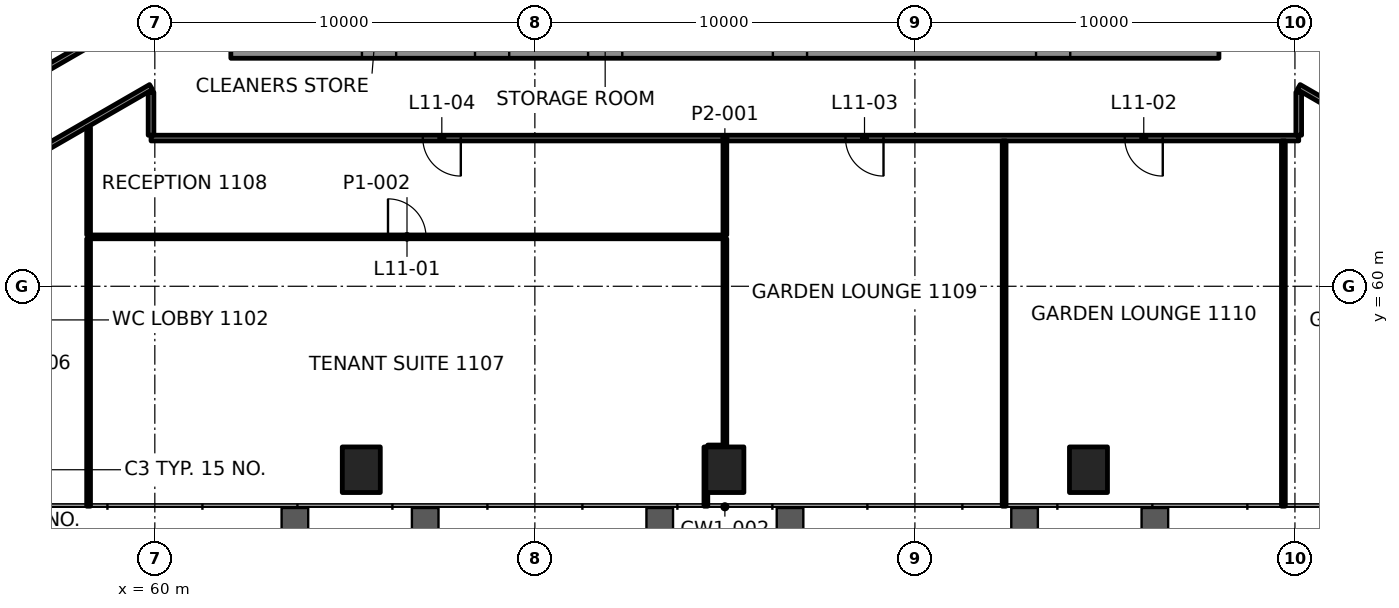
"""IFC4 building model, lengths in metres.
Left out: names, types, materials, properties, quantities, classifications, styles, units other than length and angle.
Written with IfcOpenShell. Run it as: python <this file> out.ifc"""

import sys

from ifc_helpers import new_model, si_unit, direction, frame, frame_2d, origin, origin_2d, place, context, subcontext, project, spatial, rectangle, extrude, element, fill, save


model = new_model("IFC4")
c1 = context("Model", 3, precision=1e-05, world=origin(), true_north=direction((0.0, 1.0)))
c2 = subcontext(c1, "Body", "Model", "MODEL_VIEW")
j1 = project(units=[si_unit("LENGTHUNIT", "METRE"), si_unit("PLANEANGLEUNIT", "RADIAN")], contexts=[c1])
p1 = place(None, origin())
s1 = spatial("IfcSite", under=j1, at=p1, CompositionType="ELEMENT")
p2 = place(p1, origin())
s2 = spatial("IfcBuilding", under=s1, at=p2, CompositionType="ELEMENT")
p3 = place(p2, frame((0.0, 0.0, 52.6)))
s3 = spatial("IfcBuildingStorey", under=s2, at=p3, CompositionType="ELEMENT", Elevation=52.6)
for number, where, z_axis, x_axis in (
    (1, (65.433, 55.172, -0.0), (0.0, 0.0, 1.0), (1.0, 0.0, 0.0)),
    (2, (75.0, 55.172, -0.0), (0.0, 0.0, 1.0), (1.0, 0.0, 0.0)),
    (3, (84.567, 55.172, -0.0), (0.0, 0.0, 1.0), (1.0, 0.0, 0.0)),
):
    element("IfcColumn", number, at=place(p3, frame(where, z_axis=z_axis, x_axis=x_axis)), inside=s3, PredefinedType="COLUMN", context=c2, shape_type="SweptSolid", body=[
        extrude(rectangle(XDim=1.0, YDim=1.2, at=origin_2d()), origin(), (0.0, 0.0, 1.0), 4.2),
    ])
p4 = place(p3, frame((62.0, 66.45, 0.0), z_axis=(0.0, 0.0, 1.0), x_axis=(1.0, 0.0, 0.0)))
e4 = element("IfcWall", 4, at=p4, inside=s3, PredefinedType="SHEAR", context=c2, shape_type="SweptSolid", body=[
    extrude(rectangle(XDim=26.0, YDim=0.9, at=frame_2d((13.0, 0.0))), origin(), (0.0, 0.0, 1.0), 4.0),
])
p5 = place(p4, frame((3.45, 0.0, 0.0)))
e5 = element("IfcOpeningElement", 5, at=p5, cuts=e4, PredefinedType="OPENING", context=c2, shape_type="SweptSolid", body=[
    extrude(rectangle(XDim=0.9, YDim=2.1, at=frame_2d((0.45, 1.05))), frame((0.0, 0.46, 0.0), z_axis=(0.0, -1.0, 0.0), x_axis=(1.0, 0.0, 0.0)), (0.0, 0.0, 1.0), 0.92),
])
p6 = place(p4, frame((6.425, 0.0, 0.0)))
e6 = element("IfcOpeningElement", 6, at=p6, cuts=e4, PredefinedType="OPENING", context=c2, shape_type="SweptSolid", body=[
    extrude(rectangle(XDim=0.9, YDim=2.1, at=frame_2d((0.45, 1.05))), frame((0.0, 0.46, 0.0), z_axis=(0.0, -1.0, 0.0), x_axis=(1.0, 0.0, 0.0)), (0.0, 0.0, 1.0), 0.92),
])
p7 = place(p4, frame((9.4, 0.0, 0.0)))
e7 = element("IfcOpeningElement", 7, at=p7, cuts=e4, PredefinedType="OPENING", context=c2, shape_type="SweptSolid", body=[
    extrude(rectangle(XDim=0.9, YDim=2.1, at=frame_2d((0.45, 1.05))), frame((0.0, 0.46, 0.0), z_axis=(0.0, -1.0, 0.0), x_axis=(1.0, 0.0, 0.0)), (0.0, 0.0, 1.0), 0.92),
])
p8 = place(p4, frame((14.262, 0.0, 0.0)))
e8 = element("IfcOpeningElement", 8, at=p8, cuts=e4, PredefinedType="OPENING", context=c2, shape_type="SweptSolid", body=[
    extrude(rectangle(XDim=0.9, YDim=2.1, at=frame_2d((0.45, 1.05))), frame((0.0, 0.46, 0.0), z_axis=(0.0, -1.0, 0.0), x_axis=(1.0, 0.0, 0.0)), (0.0, 0.0, 1.0), 0.92),
])
p9 = place(p4, frame((21.188, 0.0, 0.0)))
e9 = element("IfcOpeningElement", 9, at=p9, cuts=e4, PredefinedType="OPENING", context=c2, shape_type="SweptSolid", body=[
    extrude(rectangle(XDim=0.9, YDim=2.1, at=frame_2d((0.45, 1.05))), frame((0.0, 0.46, 0.0), z_axis=(0.0, -1.0, 0.0), x_axis=(1.0, 0.0, 0.0)), (0.0, 0.0, 1.0), 0.92),
])
p10 = place(p3, frame((74.551, 55.772, 0.0), z_axis=(0.0, 0.0, 1.0), x_axis=(1.0, 0.0, 0.0)))
e10 = element("IfcWall", 10, at=p10, inside=s3, PredefinedType="PARTITIONING", context=c2, shape_type="SweptSolid", body=[
    extrude(rectangle(XDim=0.399, YDim=0.1, at=frame_2d((0.199, 0.0))), origin(), (0.0, 0.0, 1.0), 3.4),
])
p11 = place(p3, frame((58.271, 61.3, 0.0), z_axis=(0.0, 0.0, 1.0), x_axis=(1.0, 0.0, 0.0)))
e11 = element("IfcWall", 11, at=p11, inside=s3, PredefinedType="PARTITIONING", context=c2, shape_type="SweptSolid", body=[
    extrude(rectangle(XDim=16.729, YDim=0.1, at=frame_2d((8.365, 0.0))), origin(), (0.0, 0.0, 1.0), 3.4),
])
p12 = place(p11, frame((7.865, 0.0, 0.0)))
e12 = element("IfcOpeningElement", 12, at=p12, cuts=e11, PredefinedType="OPENING", context=c2, shape_type="SweptSolid", body=[
    extrude(rectangle(XDim=1.0, YDim=2.1, at=frame_2d((0.5, 1.05))), frame((0.0, 0.06, 0.0), z_axis=(0.0, -1.0, 0.0), x_axis=(1.0, 0.0, 0.0)), (0.0, 0.0, 1.0), 0.12),
])
p13 = place(p3, frame((90.1, 63.9, 0.0), z_axis=(0.0, 0.0, 1.0), x_axis=(-1.0, 0.0, 0.0)))
e13 = element("IfcWall", 13, at=p13, inside=s3, PredefinedType="PARTITIONING", context=c2, shape_type="SweptSolid", body=[
    extrude(rectangle(XDim=30.2, YDim=0.15, at=frame_2d((15.1, 0.0))), origin(), (0.0, 0.0, 1.0), 3.4),
])
p14 = place(p13, frame((3.578, 0.0, 0.0)))
e14 = element("IfcOpeningElement", 14, at=p14, cuts=e13, PredefinedType="OPENING", context=c2, shape_type="SweptSolid", body=[
    extrude(rectangle(XDim=1.0, YDim=2.1, at=frame_2d((0.5, 1.05))), frame((0.0, 0.085, 0.0), z_axis=(0.0, -1.0, 0.0), x_axis=(1.0, 0.0, 0.0)), (0.0, 0.0, 1.0), 0.17),
])
p15 = place(p13, frame((10.926, 0.0, 0.0)))
e15 = element("IfcOpeningElement", 15, at=p15, cuts=e13, PredefinedType="OPENING", context=c2, shape_type="SweptSolid", body=[
    extrude(rectangle(XDim=1.0, YDim=2.1, at=frame_2d((0.5, 1.05))), frame((0.0, 0.085, 0.0), z_axis=(0.0, -1.0, 0.0), x_axis=(1.0, 0.0, 0.0)), (0.0, 0.0, 1.0), 0.17),
])
p16 = place(p13, frame((22.048, 0.0, 0.0)))
e16 = element("IfcOpeningElement", 16, at=p16, cuts=e13, PredefinedType="OPENING", context=c2, shape_type="SweptSolid", body=[
    extrude(rectangle(XDim=1.0, YDim=2.1, at=frame_2d((0.5, 1.05))), frame((0.0, 0.085, 0.0), z_axis=(0.0, -1.0, 0.0), x_axis=(1.0, 0.0, 0.0)), (0.0, 0.0, 1.0), 0.17),
])
p17 = place(p3, frame((59.9, 65.243, 0.0), z_axis=(0.0, 0.0, 1.0), x_axis=(-0.866026378386, -0.499998311937, 0.0)))
e17 = element("IfcWall", 17, at=p17, inside=s3, PredefinedType="PARTITIONING", context=c2, shape_type="SweptSolid", body=[
    extrude(rectangle(XDim=13.764, YDim=0.15, at=frame_2d((6.882, 0.0))), origin(), (0.0, 0.0, 1.0), 3.247),
])
p18 = place(p17, frame((4.209, 0.0, 0.0)))
e18 = element("IfcOpeningElement", 18, at=p18, cuts=e17, PredefinedType="OPENING", context=c2, shape_type="SweptSolid", body=[
    extrude(rectangle(XDim=0.9, YDim=2.1, at=frame_2d((0.45, 1.05))), frame((0.0, 0.085, 0.0), z_axis=(0.0, -1.0, 0.0), x_axis=(1.0, 0.0, 0.0)), (0.0, 0.0, 1.0), 0.17),
])
p19 = place(p17, frame((9.891, 0.0, 0.0)))
e19 = element("IfcOpeningElement", 19, at=p19, cuts=e17, PredefinedType="OPENING", context=c2, shape_type="SweptSolid", body=[
    extrude(rectangle(XDim=1.2, YDim=2.1, at=frame_2d((0.6, 1.05))), frame((0.0, 0.085, 0.0), z_axis=(0.0, -1.0, 0.0), x_axis=(1.0, 0.0, 0.0)), (0.0, 0.0, 1.0), 0.17),
])
p20 = place(p3, frame((47.08, 59.92, 0.0), z_axis=(0.0, 0.0, 1.0), x_axis=(0.866025356753, 0.50000008146, 0.0)))
e20 = element("IfcWall", 20, at=p20, inside=s3, PredefinedType="PARTITIONING", context=c2, shape_type="SweptSolid", body=[
    extrude(rectangle(XDim=14.717, YDim=0.15, at=frame_2d((7.358, 0.0))), origin(), (0.0, 0.0, 1.0), 3.4),
])
p21 = place(p20, frame((6.858, 0.0, 0.0)))
e21 = element("IfcOpeningElement", 21, at=p21, cuts=e20, PredefinedType="OPENING", context=c2, shape_type="SweptSolid", body=[
    extrude(rectangle(XDim=1.0, YDim=2.1, at=frame_2d((0.5, 1.05))), frame((0.0, 0.085, 0.0), z_axis=(0.0, -1.0, 0.0), x_axis=(1.0, 0.0, 0.0)), (0.0, 0.0, 1.0), 0.17),
])
p22 = place(p3, frame((57.3, 68.823, 0.0), z_axis=(0.0, 0.0, 1.0), x_axis=(-0.8660275888, -0.499996215423, 0.0)))
e22 = element("IfcWall", 22, at=p22, inside=s3, PredefinedType="PARTITIONING", context=c2, shape_type="SweptSolid", body=[
    extrude(rectangle(XDim=15.902, YDim=0.1, at=frame_2d((7.951, 0.0))), origin(), (0.0, 0.0, 1.0), 3.4),
])
p23 = place(p22, frame((1.713, 0.0, 0.0)))
e23 = element("IfcOpeningElement", 23, at=p23, cuts=e22, PredefinedType="OPENING", context=c2, shape_type="SweptSolid", body=[
    extrude(rectangle(XDim=0.9, YDim=2.1, at=frame_2d((0.45, 1.05))), frame((0.0, 0.06, 0.0), z_axis=(0.0, -1.0, 0.0), x_axis=(1.0, 0.0, 0.0)), (0.0, 0.0, 1.0), 0.12),
])
p24 = place(p22, frame((7.027, 0.0, 0.0)))
e24 = element("IfcOpeningElement", 24, at=p24, cuts=e22, PredefinedType="OPENING", context=c2, shape_type="SweptSolid", body=[
    extrude(rectangle(XDim=0.9, YDim=2.1, at=frame_2d((0.45, 1.05))), frame((0.0, 0.06, 0.0), z_axis=(0.0, -1.0, 0.0), x_axis=(1.0, 0.0, 0.0)), (0.0, 0.0, 1.0), 0.12),
])
p25 = place(p22, frame((12.816, 0.0, 0.0)))
e25 = element("IfcOpeningElement", 25, at=p25, cuts=e22, PredefinedType="OPENING", context=c2, shape_type="SweptSolid", body=[
    extrude(rectangle(XDim=0.9, YDim=2.1, at=frame_2d((0.45, 1.05))), frame((0.0, 0.06, 0.0), z_axis=(0.0, -1.0, 0.0), x_axis=(1.0, 0.0, 0.0)), (0.0, 0.0, 1.0), 0.12),
])
p26 = place(p3, frame((90.1, 63.976, 0.0), z_axis=(0.0, 0.0, 1.0), x_axis=(0.0, 1.0, 0.0)))
e26 = element("IfcWall", 26, at=p26, inside=s3, PredefinedType="PARTITIONING", context=c2, shape_type="SweptSolid", body=[
    extrude(rectangle(XDim=1.131, YDim=0.15, at=frame_2d((0.565, 0.0))), origin(), (0.0, 0.0, 1.0), 3.247),
])
for number, where, z_axis, x_axis in (
    (27, (89.696, 54.212, 0.0), (0.0, 0.0, 1.0), (0.0, 1.0, 0.0)),
    (28, (82.348, 54.212, 0.0), (0.0, 0.0, 1.0), (0.0, 1.0, 0.0)),
):
    element("IfcWall", number, at=place(p3, frame(where, z_axis=z_axis, x_axis=x_axis)), inside=s3, PredefinedType="PARTITIONING", context=c2, shape_type="SweptSolid", body=[
        extrude(rectangle(XDim=9.613, YDim=0.1, at=frame_2d((4.806, 0.0))), origin(), (0.0, 0.0, 1.0), 3.165),
    ])
p27 = place(p3, frame((75.0, 55.773, 0.0), z_axis=(0.0, 0.0, 1.0), x_axis=(0.0, 1.0, 0.0)))
e29 = element("IfcWall", 29, at=p27, inside=s3, PredefinedType="PARTITIONING", context=c2, shape_type="SweptSolid", body=[
    extrude(rectangle(XDim=5.477, YDim=0.1, at=frame_2d((2.739, 0.0))), origin(), (0.0, 0.0, 1.0), 3.4),
])
p28 = place(p3, frame((74.5, 54.212, 0.0), z_axis=(0.0, 0.0, 1.0), x_axis=(0.0, 1.0, 0.0)))
e30 = element("IfcWall", 30, at=p28, inside=s3, PredefinedType="PARTITIONING", context=c2, shape_type="SweptSolid", body=[
    extrude(rectangle(XDim=1.56, YDim=0.1, at=frame_2d((0.78, 0.0))), origin(), (0.0, 0.0, 1.0), 3.165),
])
p29 = place(p3, frame((59.9, 63.975, 0.0), z_axis=(0.0, 0.0, 1.0), x_axis=(0.0, 1.0, 0.0)))
e31 = element("IfcWall", 31, at=p29, inside=s3, PredefinedType="PARTITIONING", context=c2, shape_type="SweptSolid", body=[
    extrude(rectangle(XDim=1.131, YDim=0.15, at=frame_2d((0.565, 0.0))), origin(), (0.0, 0.0, 1.0), 3.247),
])
p30 = place(p3, frame((58.257, 54.212, 0.0), z_axis=(0.0, 0.0, 1.0), x_axis=(0.0, 1.0, 0.0)))
e32 = element("IfcWall", 32, at=p30, inside=s3, PredefinedType="PARTITIONING", context=c2, shape_type="SweptSolid", body=[
    extrude(rectangle(XDim=7.038, YDim=0.1, at=frame_2d((3.519, 0.0))), origin(), (0.0, 0.0, 1.0), 3.165),
])
p31 = place(p3, frame((90.175, 67.278, 0.0), z_axis=(0.0, 0.0, 1.0), x_axis=(0.866025356753, -0.50000008146, 0.0)))
e33 = element("IfcWall", 33, at=p31, inside=s3, PredefinedType="PARTITIONING", context=c2, shape_type="SweptSolid", body=[
    extrude(rectangle(XDim=14.717, YDim=0.15, at=frame_2d((7.358, 0.0))), origin(), (0.0, 0.0, 1.0), 3.4),
])
p32 = place(p31, frame((9.861, 0.0, 0.0)))
e34 = element("IfcOpeningElement", 34, at=p32, cuts=e33, PredefinedType="OPENING", context=c2, shape_type="SweptSolid", body=[
    extrude(rectangle(XDim=1.0, YDim=2.1, at=frame_2d((0.5, 1.05))), frame((0.0, 0.085, 0.0), z_axis=(0.0, -1.0, 0.0), x_axis=(1.0, 0.0, 0.0)), (0.0, 0.0, 1.0), 0.17),
])
p33 = place(p3, frame((102.021, 58.361, 0.0), z_axis=(0.0, 0.0, 1.0), x_axis=(-0.866027566471, 0.499996254098, 0.0)))
e35 = element("IfcWall", 35, at=p33, inside=s3, PredefinedType="PARTITIONING", context=c2, shape_type="SweptSolid", body=[
    extrude(rectangle(XDim=13.765, YDim=0.15, at=frame_2d((6.882, 0.0))), origin(), (0.0, 0.0, 1.0), 3.247),
])
p34 = place(p33, frame((2.475, 0.0, 0.0)))
e36 = element("IfcOpeningElement", 36, at=p34, cuts=e35, PredefinedType="OPENING", context=c2, shape_type="SweptSolid", body=[
    extrude(rectangle(XDim=1.0, YDim=2.1, at=frame_2d((0.5, 1.05))), frame((0.0, 0.085, 0.0), z_axis=(0.0, -1.0, 0.0), x_axis=(1.0, 0.0, 0.0)), (0.0, 0.0, 1.0), 0.17),
])
p35 = place(p33, frame((9.154, 0.0, 0.0)))
e37 = element("IfcOpeningElement", 37, at=p35, cuts=e35, PredefinedType="OPENING", context=c2, shape_type="SweptSolid", body=[
    extrude(rectangle(XDim=1.0, YDim=2.1, at=frame_2d((0.5, 1.05))), frame((0.0, 0.085, 0.0), z_axis=(0.0, -1.0, 0.0), x_axis=(1.0, 0.0, 0.0)), (0.0, 0.0, 1.0), 0.17),
])
p36 = place(p3, frame((75.0, 61.35, 0.0), z_axis=(0.0, 0.0, 1.0), x_axis=(0.0, 1.0, 0.0)))
e38 = element("IfcWall", 38, at=p36, inside=s3, PredefinedType="PARTITIONING", context=c2, shape_type="SweptSolid", body=[
    extrude(rectangle(XDim=2.475, YDim=0.1, at=frame_2d((1.237, 0.0))), origin(), (0.0, 0.0, 1.0), 3.4),
])
p37 = place(p3, frame((58.257, 61.35, 0.0), z_axis=(0.0, 0.0, 1.0), x_axis=(0.0, 1.0, 0.0)))
e39 = element("IfcWall", 39, at=p37, inside=s3, PredefinedType="PARTITIONING", context=c2, shape_type="SweptSolid", body=[
    extrude(rectangle(XDim=2.828, YDim=0.1, at=frame_2d((1.414, 0.0))), origin(), (0.0, 0.0, 1.0), 3.247),
])
p38 = place(p3, frame((110.994, 61.012, 0.0), z_axis=(0.0, 0.0, 1.0), x_axis=(-0.500000853759, 0.866024910866, 0.0)))
e40 = element("IfcWall", 40, at=p38, inside=s3, PredefinedType="SOLIDWALL", context=c2, shape_type="SweptSolid", body=[
    extrude(rectangle(XDim=60.222, YDim=0.8, at=frame_2d((30.111, 0.0))), origin(), (0.0, 0.0, 1.0), 0.9),
])
p39 = place(p12, origin())
e41 = element("IfcDoor", 41, at=p39, inside=s3, OperationType="SINGLE_SWING_RIGHT", PredefinedType="DOOR", context=c2, shape_type="SweptSolid", body=[
    extrude(rectangle(XDim=1.0, YDim=2.1, at=frame_2d((0.5, 1.05))), frame((0.0, 0.025, 0.0), z_axis=(0.0, -1.0, 0.0), x_axis=(1.0, 0.0, 0.0)), (0.0, 0.0, 1.0), 0.05),
])
fill(e12, e41)
p40 = place(p14, origin())
e42 = element("IfcDoor", 42, at=p40, inside=s3, OperationType="SINGLE_SWING_RIGHT", PredefinedType="DOOR", context=c2, shape_type="SweptSolid", body=[
    extrude(rectangle(XDim=1.0, YDim=2.1, at=frame_2d((0.5, 1.05))), frame((0.0, 0.025, 0.0), z_axis=(0.0, -1.0, 0.0), x_axis=(1.0, 0.0, 0.0)), (0.0, 0.0, 1.0), 0.05),
])
fill(e14, e42)
p41 = place(p15, origin())
e43 = element("IfcDoor", 43, at=p41, inside=s3, OperationType="SINGLE_SWING_LEFT", PredefinedType="DOOR", context=c2, shape_type="SweptSolid", body=[
    extrude(rectangle(XDim=1.0, YDim=2.1, at=frame_2d((0.5, 1.05))), frame((0.0, 0.025, 0.0), z_axis=(0.0, -1.0, 0.0), x_axis=(1.0, 0.0, 0.0)), (0.0, 0.0, 1.0), 0.05),
])
fill(e15, e43)
p42 = place(p16, origin())
e44 = element("IfcDoor", 44, at=p42, inside=s3, OperationType="SINGLE_SWING_RIGHT", PredefinedType="DOOR", context=c2, shape_type="SweptSolid", body=[
    extrude(rectangle(XDim=1.0, YDim=2.1, at=frame_2d((0.5, 1.05))), frame((0.0, 0.025, 0.0), z_axis=(0.0, -1.0, 0.0), x_axis=(1.0, 0.0, 0.0)), (0.0, 0.0, 1.0), 0.05),
])
fill(e16, e44)
save(model, sys.argv[1])
